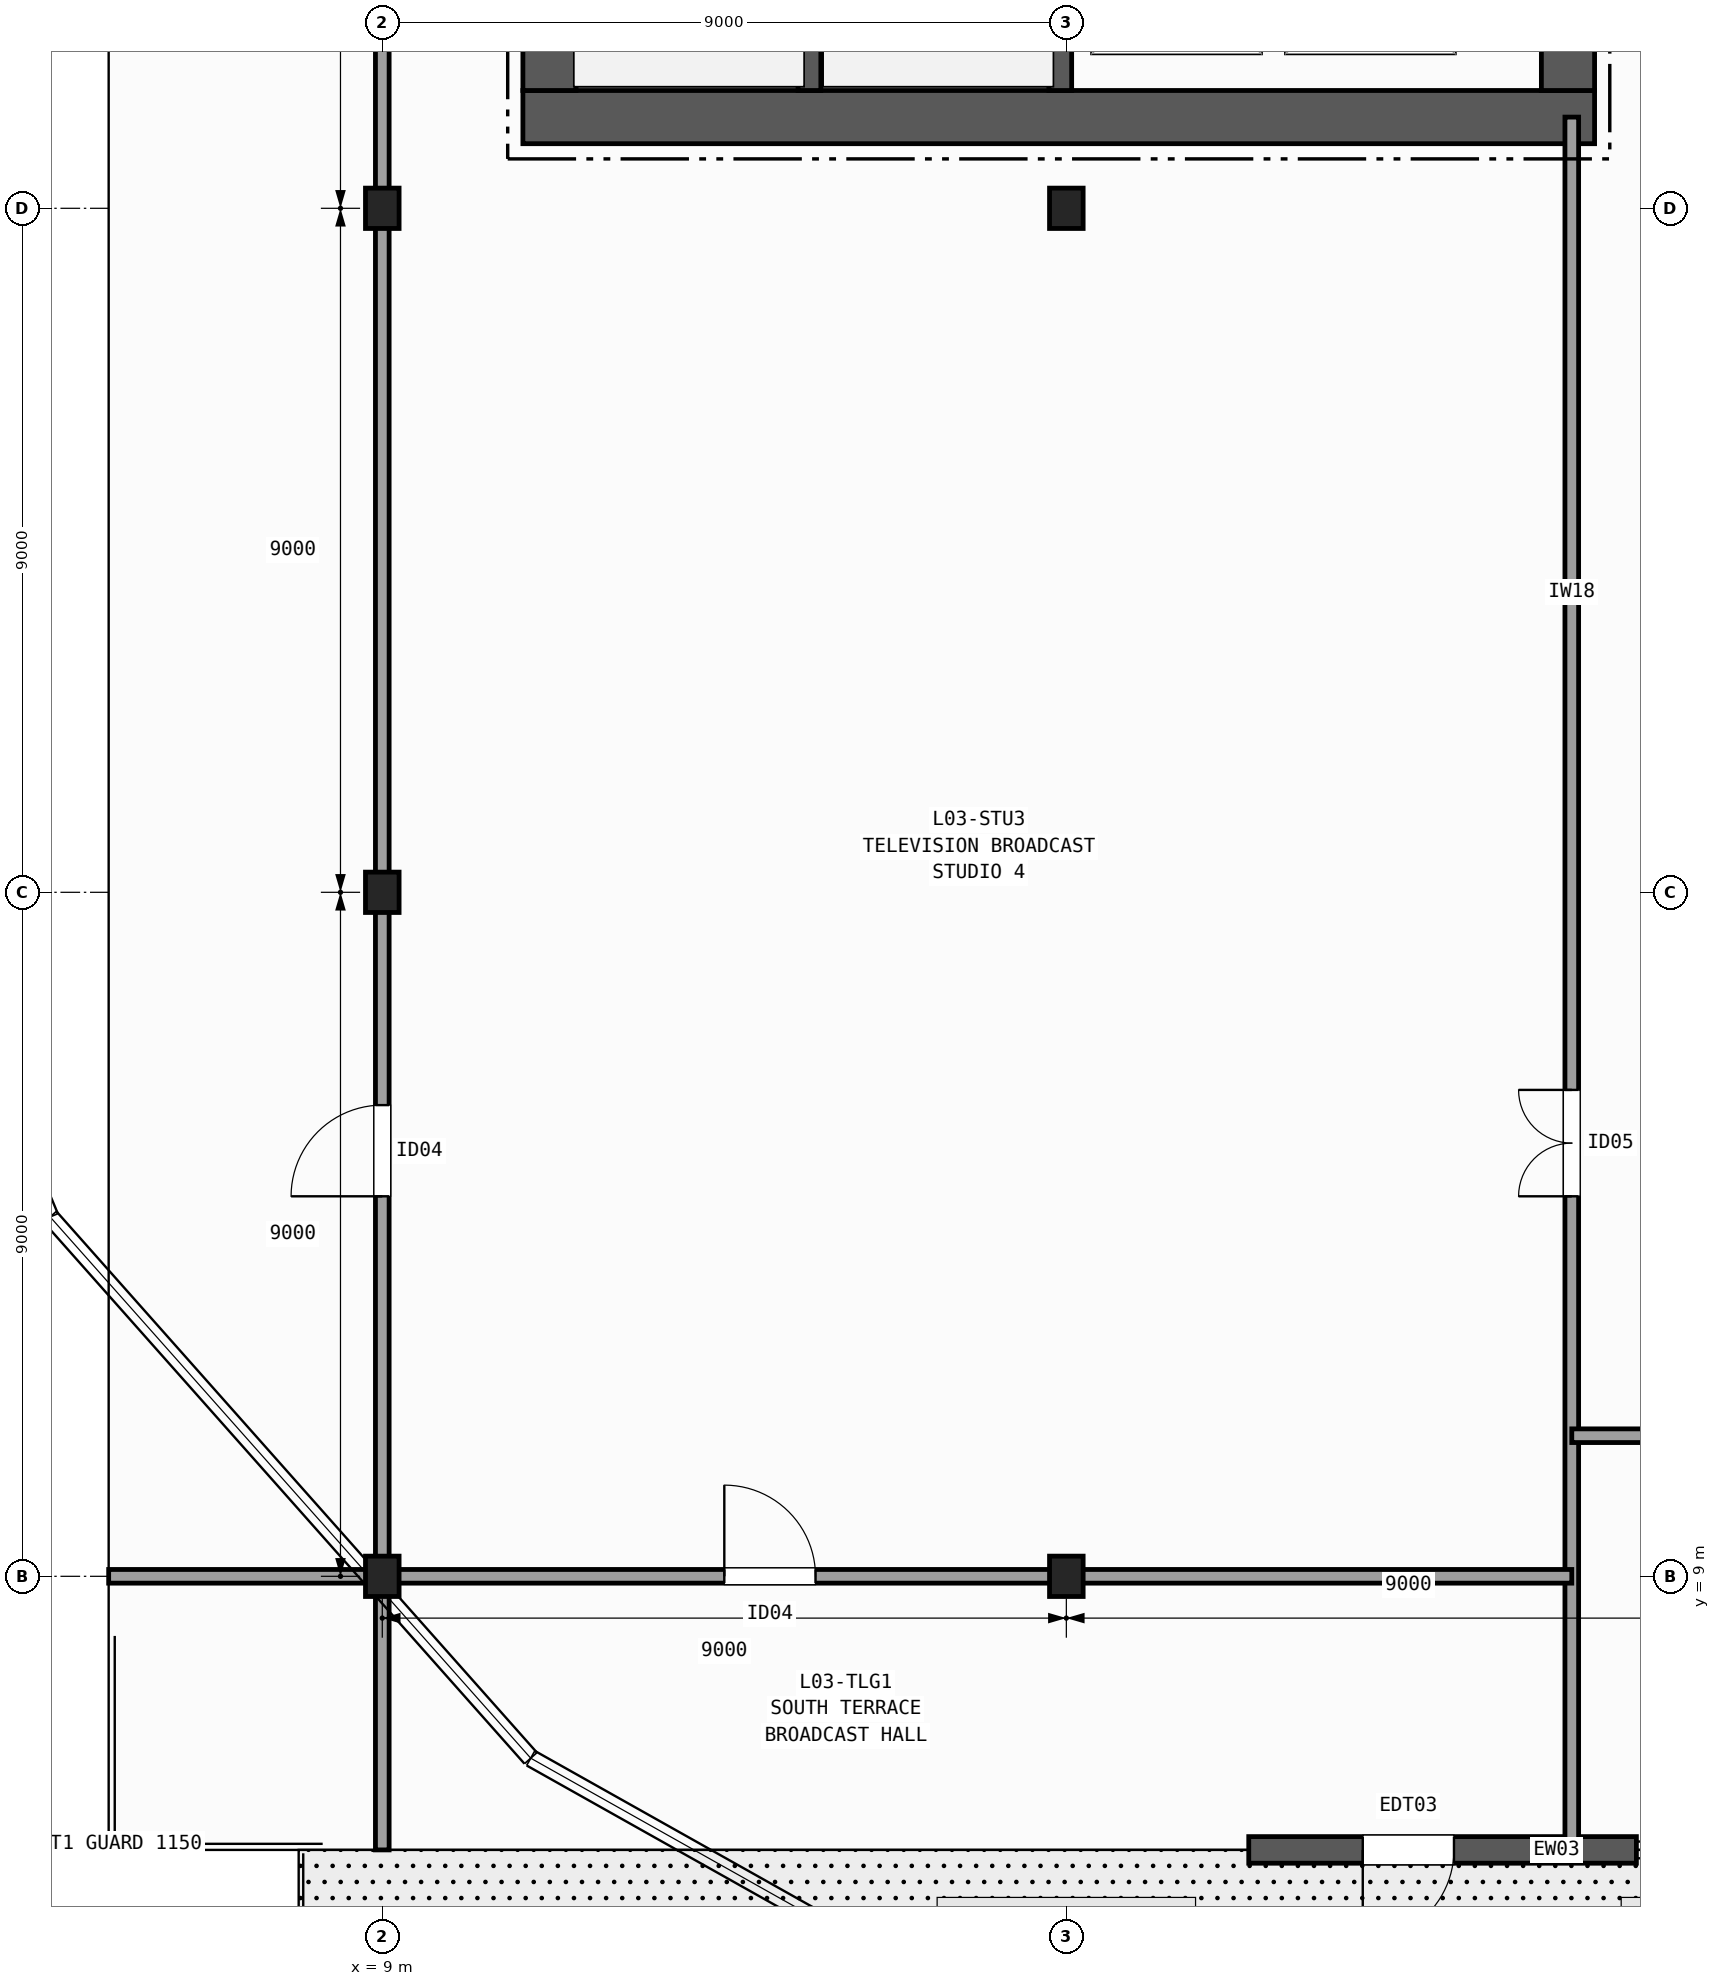
"""IFC4 building model, lengths in metres.
Left out: names, types, materials, properties, quantities, classifications, styles, units other than length and angle.
Written with IfcOpenShell. Run it as: python <this file> out.ifc"""

import sys

from ifc_helpers import new_model, si_unit, direction, frame, frame_2d, origin, origin_2d, place, context, subcontext, project, spatial, rectangle, i_section, extrude, element, fill, save


model = new_model("IFC4")
c1 = context("Model", 3, precision=1e-05, world=origin(), true_north=direction((0.0, 1.0)))
c2 = subcontext(c1, "Body", "Model", "MODEL_VIEW")
j1 = project(units=[si_unit("LENGTHUNIT", "METRE"), si_unit("PLANEANGLEUNIT", "RADIAN")], contexts=[c1])
p1 = place(None, origin())
s1 = spatial("IfcSite", under=j1, at=p1, CompositionType="ELEMENT")
p2 = place(p1, origin())
s2 = spatial("IfcBuilding", under=s1, at=p2, CompositionType="ELEMENT")
p3 = place(p2, frame((0.0, 0.0, 16.2)))
s3 = spatial("IfcBuildingStorey", under=s2, at=p3, CompositionType="ELEMENT", Elevation=16.2)
for number, where, z_axis, x_axis in (
    (1, (9.0, 9.0, 0.0), (0.0, 0.0, 1.0), (1.0, 0.0, 0.0)),
    (2, (9.0, 18.0, 0.0), (0.0, 0.0, 1.0), (1.0, 0.0, 0.0)),
    (3, (9.0, 27.0, 0.0), (0.0, 0.0, 1.0), (1.0, 0.0, 0.0)),
    (4, (18.0, 9.0, 0.0), (0.0, 0.0, 1.0), (1.0, 0.0, 0.0)),
    (5, (18.0, 27.0, 0.0), (0.0, 0.0, 1.0), (1.0, 0.0, 0.0)),
):
    element("IfcColumn", number, at=place(p3, frame(where, z_axis=z_axis, x_axis=x_axis)), inside=s3, PredefinedType="COLUMN", context=c2, shape_type="SweptSolid", body=[
        extrude(i_section(OverallWidth=0.442, OverallDepth=0.531, WebThickness=0.066, FlangeThickness=0.106, FilletRadius=0.015, at=origin_2d()), origin(), (0.0, 0.0, 1.0), 5.0),
    ])
p4 = place(p3, frame((25.5, 5.4, 0.0), z_axis=(0.0, 0.0, 1.0), x_axis=(-1.0, 0.0, 0.0)))
e6 = element("IfcWall", 6, at=p4, inside=s3, PredefinedType="SOLIDWALL", context=c2, shape_type="SweptSolid", body=[
    extrude(rectangle(XDim=5.1, YDim=0.35, at=frame_2d((2.55, 0.0))), origin(), (0.0, 0.0, 1.0), 4.68),
])
p5 = place(p4, frame((2.4, 0.0, 0.0)))
e7 = element("IfcOpeningElement", 7, at=p5, cuts=e6, PredefinedType="OPENING", context=c2, shape_type="SweptSolid", body=[
    extrude(rectangle(XDim=1.2, YDim=2.2, at=frame_2d((0.6, 1.1))), frame((0.0, 0.185, 0.0), z_axis=(0.0, -1.0, 0.0), x_axis=(1.0, 0.0, 0.0)), (0.0, 0.0, 1.0), 0.37),
])
p6 = place(p3, frame((10.85, 28.2, 0.0), z_axis=(0.0, 0.0, 1.0), x_axis=(1.0, 0.0, 0.0)))
e8 = element("IfcWall", 8, at=p6, inside=s3, PredefinedType="SHEAR", context=c2, shape_type="SweptSolid", body=[
    extrude(rectangle(XDim=14.1, YDim=0.7, at=frame_2d((7.05, 0.0))), origin(), (0.0, 0.0, 1.0), 4.68),
])
p7 = place(p3, frame((11.2, 42.05, 0.0), z_axis=(0.0, 0.0, 1.0), x_axis=(0.0, -1.0, 0.0)))
e9 = element("IfcWall", 9, at=p7, inside=s3, PredefinedType="SHEAR", context=c2, shape_type="SweptSolid", body=[
    extrude(rectangle(XDim=13.5, YDim=0.7, at=frame_2d((6.75, 0.0))), origin(), (0.0, 0.0, 1.0), 4.68),
])
p8 = place(p3, frame((24.6, 28.55, 0.0), z_axis=(0.0, 0.0, 1.0), x_axis=(0.0, 1.0, 0.0)))
e10 = element("IfcWall", 10, at=p8, inside=s3, PredefinedType="SHEAR", context=c2, shape_type="SweptSolid", body=[
    extrude(rectangle(XDim=13.5, YDim=0.7, at=frame_2d((6.75, 0.0))), origin(), (0.0, 0.0, 1.0), 4.68),
])
p9 = place(p8, frame((3.25, 0.0, 0.0)))
e11 = element("IfcOpeningElement", 11, at=p9, cuts=e10, PredefinedType="OPENING", context=c2, shape_type="SweptSolid", body=[
    extrude(rectangle(XDim=1.5, YDim=2.2, at=frame_2d((0.75, 1.1))), frame((0.0, 0.36, 0.0), z_axis=(0.0, -1.0, 0.0), x_axis=(1.0, 0.0, 0.0)), (0.0, 0.0, 1.0), 0.72),
])
p10 = place(p8, frame((9.85, 0.0, 0.0)))
e12 = element("IfcOpeningElement", 12, at=p10, cuts=e10, PredefinedType="OPENING", context=c2, shape_type="SweptSolid", body=[
    extrude(rectangle(XDim=0.9, YDim=2.1, at=frame_2d((0.45, 1.05))), frame((0.0, 0.36, 0.0), z_axis=(0.0, -1.0, 0.0), x_axis=(1.0, 0.0, 0.0)), (0.0, 0.0, 1.0), 0.72),
])
p11 = place(p3, frame((14.62, 28.55, 0.0), z_axis=(0.0, 0.0, 1.0), x_axis=(0.0, 1.0, 0.0)))
e13 = element("IfcWall", 13, at=p11, inside=s3, PredefinedType="SHEAR", context=c2, shape_type="SweptSolid", body=[
    extrude(rectangle(XDim=8.9, YDim=0.3, at=frame_2d((4.45, 0.0))), origin(), (0.0, 0.0, 1.0), 4.68),
])
p12 = place(p3, frame((17.92, 42.05, 0.0), z_axis=(0.0, 0.0, 1.0), x_axis=(0.0, -1.0, 0.0)))
e14 = element("IfcWall", 14, at=p12, inside=s3, PredefinedType="SHEAR", context=c2, shape_type="SweptSolid", body=[
    extrude(rectangle(XDim=13.5, YDim=0.3, at=frame_2d((6.75, 0.0))), origin(), (0.0, 0.0, 1.0), 4.68),
])
p13 = place(p12, frame((1.875, 0.0, 0.0)))
e15 = element("IfcOpeningElement", 15, at=p13, cuts=e14, PredefinedType="OPENING", context=c2, shape_type="SweptSolid", body=[
    extrude(rectangle(XDim=1.15, YDim=2.15, at=frame_2d((0.575, 1.075))), frame((0.0, 0.16, 0.0), z_axis=(0.0, -1.0, 0.0), x_axis=(1.0, 0.0, 0.0)), (0.0, 0.0, 1.0), 0.32),
])
p14 = place(p3, frame((24.65, 5.4, 0.0), z_axis=(0.0, 0.0, 1.0), x_axis=(0.0, 1.0, 0.0)))
e16 = element("IfcWall", 16, at=p14, inside=s3, PredefinedType="PARTITIONING", context=c2, shape_type="SweptSolid", body=[
    extrude(rectangle(XDim=22.8, YDim=0.18, at=frame_2d((11.4, 0.0))), origin(), (0.0, 0.0, 1.0), 3.712),
])
p15 = place(p14, frame((8.6, 0.0, 0.0)))
e17 = element("IfcOpeningElement", 17, at=p15, cuts=e16, PredefinedType="OPENING", context=c2, shape_type="SweptSolid", body=[
    extrude(rectangle(XDim=1.4, YDim=2.15, at=frame_2d((0.7, 1.075))), frame((0.0, 0.1, 0.0), z_axis=(0.0, -1.0, 0.0), x_axis=(1.0, 0.0, 0.0)), (0.0, 0.0, 1.0), 0.2),
])
p16 = place(p3, frame((24.65, 10.85, 0.0), z_axis=(0.0, 0.0, 1.0), x_axis=(1.0, 0.0, 0.0)))
e18 = element("IfcWall", 18, at=p16, inside=s3, PredefinedType="PARTITIONING", context=c2, shape_type="SweptSolid", body=[
    extrude(rectangle(XDim=38.35, YDim=0.18, at=frame_2d((19.175, 0.0))), origin(), (0.0, 0.0, 1.0), 3.805),
])
p17 = place(p16, frame((2.0, 0.0, 0.0)))
e19 = element("IfcOpeningElement", 19, at=p17, cuts=e18, PredefinedType="OPENING", context=c2, shape_type="SweptSolid", body=[
    extrude(rectangle(XDim=1.2, YDim=2.15, at=frame_2d((0.6, 1.075))), frame((0.0, 0.1, 0.0), z_axis=(0.0, -1.0, 0.0), x_axis=(1.0, 0.0, 0.0)), (0.0, 0.0, 1.0), 0.2),
])
p18 = place(p3, frame((9.0, 5.4, 0.0), z_axis=(0.0, 0.0, 1.0), x_axis=(0.0, 1.0, 0.0)))
e20 = element("IfcWall", 20, at=p18, inside=s3, PredefinedType="PARTITIONING", context=c2, shape_type="SweptSolid", body=[
    extrude(rectangle(XDim=48.6, YDim=0.18, at=frame_2d((24.3, 0.0))), origin(), (0.0, 0.0, 1.0), 3.712),
])
p19 = place(p18, frame((8.6, 0.0, 0.0)))
e21 = element("IfcOpeningElement", 21, at=p19, cuts=e20, PredefinedType="OPENING", context=c2, shape_type="SweptSolid", body=[
    extrude(rectangle(XDim=1.2, YDim=2.15, at=frame_2d((0.6, 1.075))), frame((0.0, 0.1, 0.0), z_axis=(0.0, -1.0, 0.0), x_axis=(1.0, 0.0, 0.0)), (0.0, 0.0, 1.0), 0.2),
])
p20 = place(p3, frame((5.4, 9.0, 0.0), z_axis=(0.0, 0.0, 1.0), x_axis=(1.0, 0.0, 0.0)))
e22 = element("IfcWall", 22, at=p20, inside=s3, PredefinedType="PARTITIONING", context=c2, shape_type="SweptSolid", body=[
    extrude(rectangle(XDim=19.25, YDim=0.18, at=frame_2d((9.625, 0.0))), origin(), (0.0, 0.0, 1.0), 3.733),
])
p21 = place(p20, frame((8.1, 0.0, 0.0)))
e23 = element("IfcOpeningElement", 23, at=p21, cuts=e22, PredefinedType="OPENING", context=c2, shape_type="SweptSolid", body=[
    extrude(rectangle(XDim=1.2, YDim=2.15, at=frame_2d((0.6, 1.075))), frame((0.0, 0.1, 0.0), z_axis=(0.0, -1.0, 0.0), x_axis=(1.0, 0.0, 0.0)), (0.0, 0.0, 1.0), 0.2),
])
p22 = place(p5, origin())
e24 = element("IfcDoor", 24, at=p22, inside=s3, OperationType="SINGLE_SWING_RIGHT", PredefinedType="DOOR", context=c2, shape_type="SweptSolid", body=[
    extrude(rectangle(XDim=1.2, YDim=2.2, at=frame_2d((0.6, 1.1))), frame((0.0, 0.025, 0.0), z_axis=(0.0, -1.0, 0.0), x_axis=(1.0, 0.0, 0.0)), (0.0, 0.0, 1.0), 0.05),
])
fill(e7, e24)
p23 = place(p15, origin())
e25 = element("IfcDoor", 25, at=p23, inside=s3, OperationType="DOUBLE_DOOR_SINGLE_SWING", PredefinedType="DOOR", context=c2, shape_type="SweptSolid", body=[
    extrude(rectangle(XDim=1.4, YDim=2.15, at=frame_2d((0.7, 1.075))), frame((0.0, 0.025, 0.0), z_axis=(0.0, -1.0, 0.0), x_axis=(1.0, 0.0, 0.0)), (0.0, 0.0, 1.0), 0.05),
])
fill(e17, e25)
p24 = place(p19, origin())
e26 = element("IfcDoor", 26, at=p24, inside=s3, OperationType="SINGLE_SWING_LEFT", PredefinedType="DOOR", context=c2, shape_type="SweptSolid", body=[
    extrude(rectangle(XDim=1.2, YDim=2.15, at=frame_2d((0.6, 1.075))), frame((0.0, 0.025, 0.0), z_axis=(0.0, -1.0, 0.0), x_axis=(1.0, 0.0, 0.0)), (0.0, 0.0, 1.0), 0.05),
])
fill(e21, e26)
p25 = place(p21, origin())
e27 = element("IfcDoor", 27, at=p25, inside=s3, OperationType="SINGLE_SWING_LEFT", PredefinedType="DOOR", context=c2, shape_type="SweptSolid", body=[
    extrude(rectangle(XDim=1.2, YDim=2.15, at=frame_2d((0.6, 1.075))), frame((0.0, 0.025, 0.0), z_axis=(0.0, -1.0, 0.0), x_axis=(1.0, 0.0, 0.0)), (0.0, 0.0, 1.0), 0.05),
])
fill(e23, e27)
save(model, sys.argv[1])
